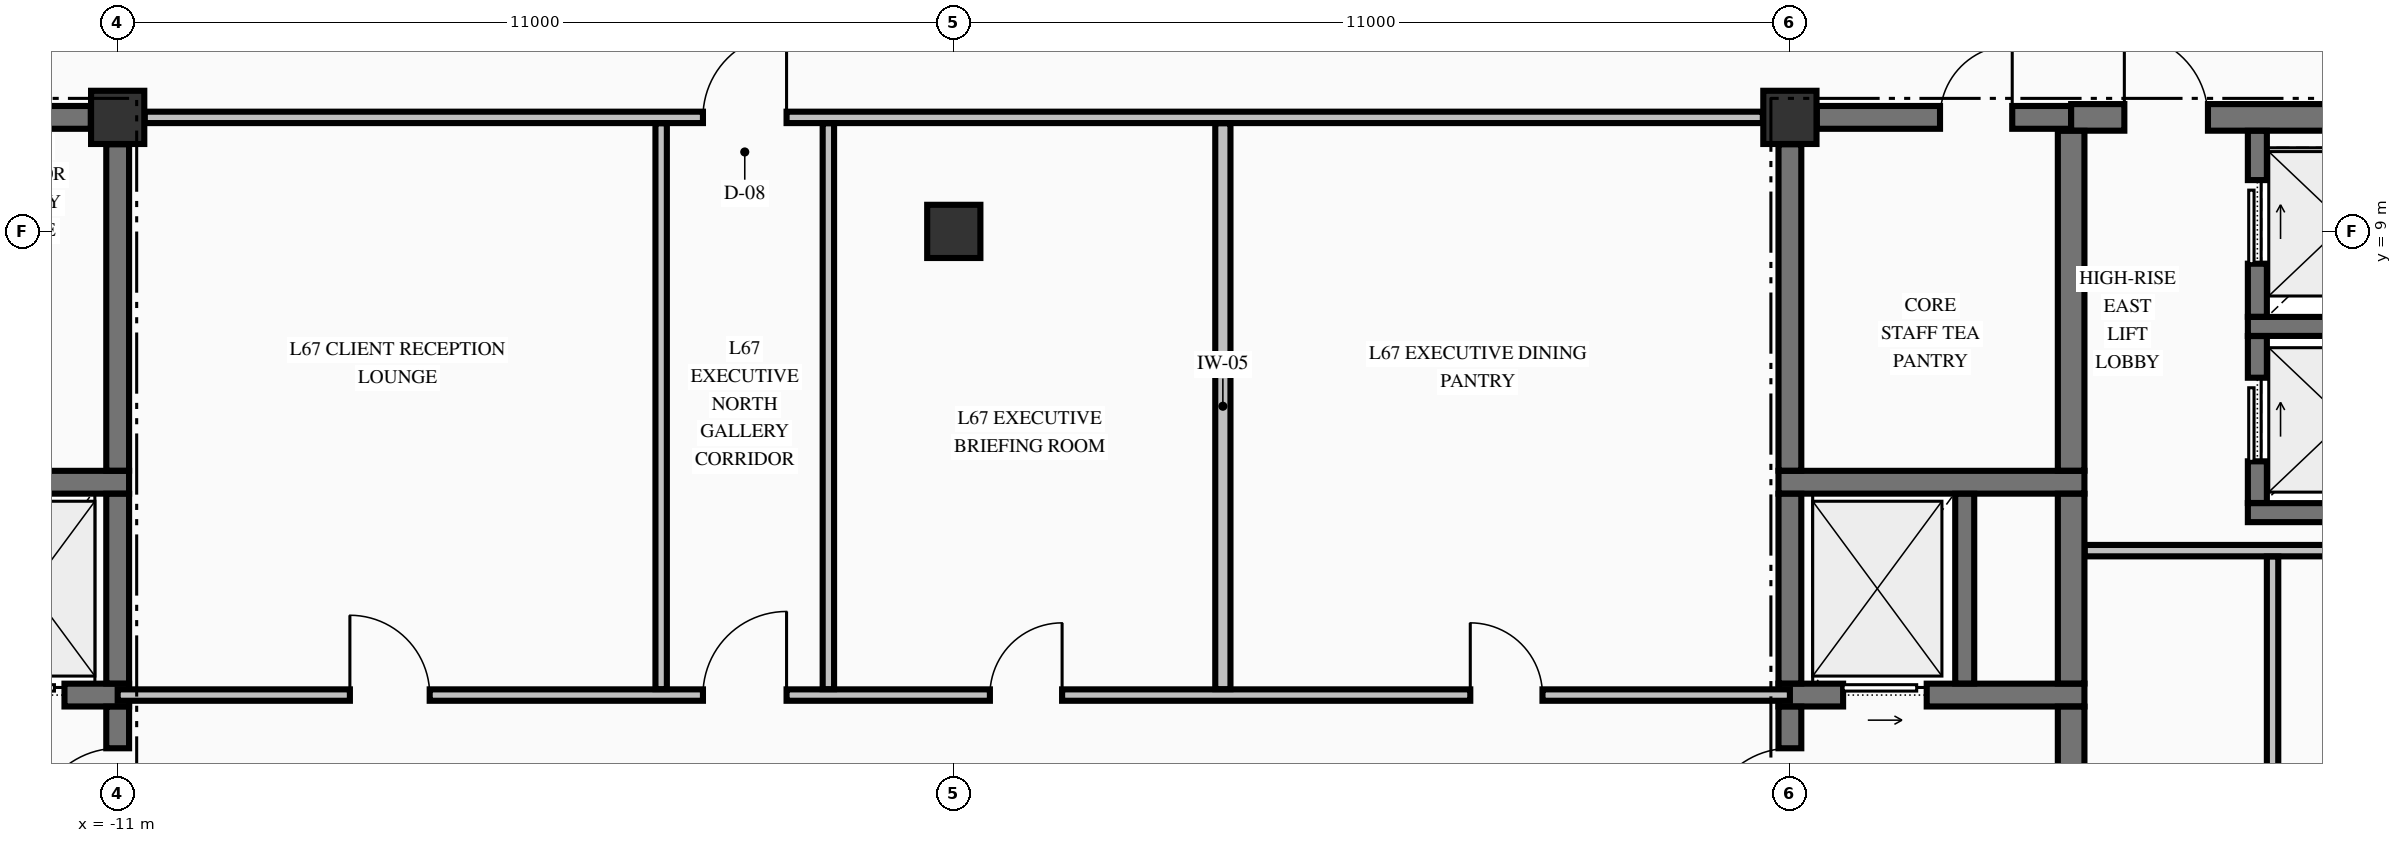
"""IFC4 building model, lengths in metres.
Left out: names, types, materials, properties, quantities, classifications, styles, units other than length and angle.
Written with IfcOpenShell. Run it as: python <this file> out.ifc"""

import sys

from ifc_helpers import new_model, si_unit, direction, frame, frame_2d, origin, origin_2d, place, context, subcontext, project, spatial, rectangle, extrude, element, fill, save


model = new_model("IFC4")
c1 = context("Model", 3, precision=1e-05, world=origin(), true_north=direction((0.0, 1.0)))
c2 = subcontext(c1, "Body", "Model", "MODEL_VIEW")
j1 = project(units=[si_unit("LENGTHUNIT", "METRE"), si_unit("PLANEANGLEUNIT", "RADIAN")], contexts=[c1])
p1 = place(None, origin())
s1 = spatial("IfcSite", under=j1, at=p1, CompositionType="ELEMENT")
p2 = place(p1, origin())
s2 = spatial("IfcBuilding", under=s1, at=p2, CompositionType="ELEMENT")
p3 = place(p2, frame((0.0, 0.0, 254.43)))
s3 = spatial("IfcBuildingStorey", under=s2, at=p3, CompositionType="ELEMENT", Elevation=254.43)
for number, where, z_axis, x_axis in (
    (1, (-11.0, 10.5, -0.425), (0.0, 0.0, 1.0), (1.0, 0.0, 0.0)),
    (2, (11.0, 10.5, -0.425), (0.0, 0.0, 1.0), (1.0, 0.0, 0.0)),
    (3, (0.0, 9.0, -0.425), (0.0, 0.0, 1.0), (1.0, 0.0, 0.0)),
):
    element("IfcColumn", number, at=place(p3, frame(where, z_axis=z_axis, x_axis=x_axis)), inside=s3, PredefinedType="COLUMN", context=c2, shape_type="SweptSolid", body=[
        extrude(rectangle(XDim=0.7, YDim=0.7, at=origin_2d()), origin(), (0.0, 0.0, 1.0), 3.405),
    ])
p4 = place(p3, frame((-14.875, 2.9, 0.0), z_axis=(0.0, 0.0, 1.0), x_axis=(1.0, 0.0, 0.0)))
e4 = element("IfcWall", 4, at=p4, inside=s3, PredefinedType="SHEAR", context=c2, shape_type="SweptSolid", body=[
    extrude(rectangle(XDim=4.025, YDim=0.3, at=frame_2d((2.012, 0.0))), origin(), (0.0, 0.0, 1.0), 2.98),
])
p5 = place(p4, frame((2.075, 0.0, 0.0)))
e5 = element("IfcOpeningElement", 5, at=p5, cuts=e4, PredefinedType="OPENING", context=c2, shape_type="SweptSolid", body=[
    extrude(rectangle(XDim=1.1, YDim=2.2, at=frame_2d((0.55, 1.1))), frame((0.0, 0.16, 0.0), z_axis=(0.0, -1.0, 0.0), x_axis=(1.0, 0.0, 0.0)), (0.0, 0.0, 1.0), 0.32),
])
p6 = place(p3, frame((10.85, 2.9, 0.0), z_axis=(0.0, 0.0, 1.0), x_axis=(1.0, 0.0, 0.0)))
e6 = element("IfcWall", 6, at=p6, inside=s3, PredefinedType="SHEAR", context=c2, shape_type="SweptSolid", body=[
    extrude(rectangle(XDim=4.025, YDim=0.3, at=frame_2d((2.012, 0.0))), origin(), (0.0, 0.0, 1.0), 2.98),
])
p7 = place(p6, frame((0.85, 0.0, 0.0)))
e7 = element("IfcOpeningElement", 7, at=p7, cuts=e6, PredefinedType="OPENING", context=c2, shape_type="SweptSolid", body=[
    extrude(rectangle(XDim=1.1, YDim=2.2, at=frame_2d((0.55, 1.1))), frame((0.0, 0.16, 0.0), z_axis=(0.0, -1.0, 0.0), x_axis=(1.0, 0.0, 0.0)), (0.0, 0.0, 1.0), 0.32),
])
p8 = place(p3, frame((17.025, 5.3, 0.0), z_axis=(0.0, 0.0, 1.0), x_axis=(1.0, 0.0, 0.0)))
e8 = element("IfcWall", 8, at=p8, inside=s3, PredefinedType="SOLIDWALL", context=c2, shape_type="SweptSolid", body=[
    extrude(rectangle(XDim=3.15, YDim=0.25, at=frame_2d((1.575, 0.0))), origin(), (0.0, 0.0, 1.0), 2.98),
])
for number, where, z_axis, x_axis in (
    (9, (-14.875, 5.7, 0.0), (0.0, 0.0, 1.0), (1.0, 0.0, 0.0)),
    (10, (10.85, 5.7, 0.0), (0.0, 0.0, 1.0), (1.0, 0.0, 0.0)),
):
    element("IfcWall", number, at=place(p3, frame(where, z_axis=z_axis, x_axis=x_axis)), inside=s3, PredefinedType="SHEAR", context=c2, shape_type="SweptSolid", body=[
        extrude(rectangle(XDim=4.025, YDim=0.3, at=frame_2d((2.012, 0.0))), origin(), (0.0, 0.0, 1.0), 2.98),
    ])
p9 = place(p3, frame((17.025, 7.75, 0.0), z_axis=(0.0, 0.0, 1.0), x_axis=(1.0, 0.0, 0.0)))
e11 = element("IfcWall", 11, at=p9, inside=s3, PredefinedType="SOLIDWALL", context=c2, shape_type="SweptSolid", body=[
    extrude(rectangle(XDim=3.15, YDim=0.25, at=frame_2d((1.575, 0.0))), origin(), (0.0, 0.0, 1.0), 2.98),
])
p10 = place(p3, frame((-14.7, 10.5, 0.0), z_axis=(0.0, 0.0, 1.0), x_axis=(1.0, 0.0, 0.0)))
e12 = element("IfcWall", 12, at=p10, inside=s3, PredefinedType="SHEAR", context=c2, shape_type="SweptSolid", body=[
    extrude(rectangle(XDim=3.346, YDim=0.3, at=frame_2d((1.673, 0.0))), origin(), (0.0, 0.0, 1.0), 2.98),
])
p11 = place(p10, frame((0.245, 0.0, 0.0)))
e13 = element("IfcOpeningElement", 13, at=p11, cuts=e12, PredefinedType="OPENING", context=c2, shape_type="SweptSolid", body=[
    extrude(rectangle(XDim=0.95, YDim=2.15, at=frame_2d((0.475, 1.075))), frame((0.0, 0.16, 0.0), z_axis=(0.0, -1.0, 0.0), x_axis=(1.0, 0.0, 0.0)), (0.0, 0.0, 1.0), 0.32),
])
p12 = place(p3, frame((11.354, 10.5, 0.0), z_axis=(0.0, 0.0, 1.0), x_axis=(1.0, 0.0, 0.0)))
e14 = element("IfcWall", 14, at=p12, inside=s3, PredefinedType="SHEAR", context=c2, shape_type="SweptSolid", body=[
    extrude(rectangle(XDim=3.346, YDim=0.3, at=frame_2d((1.673, 0.0))), origin(), (0.0, 0.0, 1.0), 2.98),
])
p13 = place(p12, frame((1.621, 0.0, 0.0)))
e15 = element("IfcOpeningElement", 15, at=p13, cuts=e14, PredefinedType="OPENING", context=c2, shape_type="SweptSolid", body=[
    extrude(rectangle(XDim=0.95, YDim=2.15, at=frame_2d((0.475, 1.075))), frame((0.0, 0.16, 0.0), z_axis=(0.0, -1.0, 0.0), x_axis=(1.0, 0.0, 0.0)), (0.0, 0.0, 1.0), 0.32),
])
p14 = place(p3, frame((14.7, 10.5, 0.0), z_axis=(0.0, 0.0, 1.0), x_axis=(1.0, 0.0, 0.0)))
e16 = element("IfcWall", 16, at=p14, inside=s3, PredefinedType="SHEAR", context=c2, shape_type="SweptSolid", body=[
    extrude(rectangle(XDim=4.946, YDim=0.35, at=frame_2d((2.473, 0.0))), origin(), (0.0, 0.0, 1.0), 2.98),
])
p15 = place(p14, frame((0.7, 0.0, 0.0)))
e17 = element("IfcOpeningElement", 17, at=p15, cuts=e16, PredefinedType="OPENING", context=c2, shape_type="SweptSolid", body=[
    extrude(rectangle(XDim=1.1, YDim=2.15, at=frame_2d((0.55, 1.075))), frame((0.0, 0.185, 0.0), z_axis=(0.0, -1.0, 0.0), x_axis=(1.0, 0.0, 0.0)), (0.0, 0.0, 1.0), 0.37),
])
p16 = place(p3, frame((-11.0, 2.9, 0.0), z_axis=(0.0, 0.0, 1.0), x_axis=(1.0, 0.0, 0.0)))
e18 = element("IfcWall", 18, at=p16, inside=s3, PredefinedType="PARTITIONING", context=c2, shape_type="SweptSolid", body=[
    extrude(rectangle(XDim=22.0, YDim=0.15, at=frame_2d((11.0, 0.0))), origin(), (0.0, 0.0, 1.0), 2.98),
])
p17 = place(p16, frame((7.7, 0.0, 0.0)))
e19 = element("IfcOpeningElement", 19, at=p17, cuts=e18, PredefinedType="OPENING", context=c2, shape_type="SweptSolid", body=[
    extrude(rectangle(XDim=1.1, YDim=2.15, at=frame_2d((0.55, 1.075))), frame((0.0, 0.085, 0.0), z_axis=(0.0, -1.0, 0.0), x_axis=(1.0, 0.0, 0.0)), (0.0, 0.0, 1.0), 0.17),
])
p18 = place(p16, frame((3.055, 0.0, 0.0)))
e20 = element("IfcOpeningElement", 20, at=p18, cuts=e18, PredefinedType="OPENING", context=c2, shape_type="SweptSolid", body=[
    extrude(rectangle(XDim=1.05, YDim=2.15, at=frame_2d((0.525, 1.075))), frame((0.0, 0.085, 0.0), z_axis=(0.0, -1.0, 0.0), x_axis=(1.0, 0.0, 0.0)), (0.0, 0.0, 1.0), 0.17),
])
p19 = place(p16, frame((11.475, 0.0, 0.0)))
e21 = element("IfcOpeningElement", 21, at=p19, cuts=e18, PredefinedType="OPENING", context=c2, shape_type="SweptSolid", body=[
    extrude(rectangle(XDim=0.95, YDim=2.15, at=frame_2d((0.475, 1.075))), frame((0.0, 0.085, 0.0), z_axis=(0.0, -1.0, 0.0), x_axis=(1.0, 0.0, 0.0)), (0.0, 0.0, 1.0), 0.17),
])
p20 = place(p16, frame((17.795, 0.0, 0.0)))
e22 = element("IfcOpeningElement", 22, at=p20, cuts=e18, PredefinedType="OPENING", context=c2, shape_type="SweptSolid", body=[
    extrude(rectangle(XDim=0.95, YDim=2.15, at=frame_2d((0.475, 1.075))), frame((0.0, 0.085, 0.0), z_axis=(0.0, -1.0, 0.0), x_axis=(1.0, 0.0, 0.0)), (0.0, 0.0, 1.0), 0.17),
])
p21 = place(p3, frame((14.878, 4.8, 0.0), z_axis=(0.0, 0.0, 1.0), x_axis=(1.0, 0.0, 0.0)))
e23 = element("IfcWall", 23, at=p21, inside=s3, PredefinedType="PARTITIONING", context=c2, shape_type="SweptSolid", body=[
    extrude(rectangle(XDim=4.944, YDim=0.15, at=frame_2d((2.472, 0.0))), origin(), (0.0, 0.0, 1.0), 2.98),
])
p22 = place(p3, frame((-10.644, 10.5, 0.0), z_axis=(0.0, 0.0, 1.0), x_axis=(1.0, 0.0, 0.0)))
e24 = element("IfcWall", 24, at=p22, inside=s3, PredefinedType="PARTITIONING", context=c2, shape_type="SweptSolid", body=[
    extrude(rectangle(XDim=21.288, YDim=0.15, at=frame_2d((10.644, 0.0))), origin(), (0.0, 0.0, 1.0), 2.98),
])
p23 = place(p22, frame((7.344, 0.0, 0.0)))
e25 = element("IfcOpeningElement", 25, at=p23, cuts=e24, PredefinedType="OPENING", context=c2, shape_type="SweptSolid", body=[
    extrude(rectangle(XDim=1.1, YDim=2.15, at=frame_2d((0.55, 1.075))), frame((0.0, 0.085, 0.0), z_axis=(0.0, -1.0, 0.0), x_axis=(1.0, 0.0, 0.0)), (0.0, 0.0, 1.0), 0.17),
])
p24 = place(p3, frame((-11.0, 0.354, 0.0), z_axis=(0.0, 0.0, 1.0), x_axis=(0.0, 1.0, 0.0)))
e26 = element("IfcWall", 26, at=p24, inside=s3, PredefinedType="SHEAR", context=c2, shape_type="SweptSolid", body=[
    extrude(rectangle(XDim=2.394, YDim=0.3, at=frame_2d((1.197, 0.0))), origin(), (0.0, 0.0, 1.0), 2.98),
])
p25 = place(p24, frame((0.746, 0.0, 0.0)))
e27 = element("IfcOpeningElement", 27, at=p25, cuts=e26, PredefinedType="OPENING", context=c2, shape_type="SweptSolid", body=[
    extrude(rectangle(XDim=1.1, YDim=2.15, at=frame_2d((0.55, 1.075))), frame((0.0, 0.16, 0.0), z_axis=(0.0, -1.0, 0.0), x_axis=(1.0, 0.0, 0.0)), (0.0, 0.0, 1.0), 0.32),
])
p26 = place(p3, frame((-11.0, 3.052, 0.0), z_axis=(0.0, 0.0, 1.0), x_axis=(0.0, 1.0, 0.0)))
e28 = element("IfcWall", 28, at=p26, inside=s3, PredefinedType="SHEAR", context=c2, shape_type="SweptSolid", body=[
    extrude(rectangle(XDim=2.496, YDim=0.3, at=frame_2d((1.248, 0.0))), origin(), (0.0, 0.0, 1.0), 2.98),
])
p27 = place(p3, frame((-11.0, 5.852, 0.0), z_axis=(0.0, 0.0, 1.0), x_axis=(0.0, 1.0, 0.0)))
e29 = element("IfcWall", 29, at=p27, inside=s3, PredefinedType="SHEAR", context=c2, shape_type="SweptSolid", body=[
    extrude(rectangle(XDim=4.294, YDim=0.3, at=frame_2d((2.147, 0.0))), origin(), (0.0, 0.0, 1.0), 2.98),
])
p28 = place(p3, frame((11.0, 0.354, 0.0), z_axis=(0.0, 0.0, 1.0), x_axis=(0.0, 1.0, 0.0)))
e30 = element("IfcWall", 30, at=p28, inside=s3, PredefinedType="SHEAR", context=c2, shape_type="SweptSolid", body=[
    extrude(rectangle(XDim=2.394, YDim=0.3, at=frame_2d((1.197, 0.0))), origin(), (0.0, 0.0, 1.0), 2.98),
])
p29 = place(p28, frame((0.746, 0.0, 0.0)))
e31 = element("IfcOpeningElement", 31, at=p29, cuts=e30, PredefinedType="OPENING", context=c2, shape_type="SweptSolid", body=[
    extrude(rectangle(XDim=1.1, YDim=2.15, at=frame_2d((0.55, 1.075))), frame((0.0, 0.16, 0.0), z_axis=(0.0, -1.0, 0.0), x_axis=(1.0, 0.0, 0.0)), (0.0, 0.0, 1.0), 0.32),
])
p30 = place(p3, frame((11.0, 3.052, 0.0), z_axis=(0.0, 0.0, 1.0), x_axis=(0.0, 1.0, 0.0)))
e32 = element("IfcWall", 32, at=p30, inside=s3, PredefinedType="SHEAR", context=c2, shape_type="SweptSolid", body=[
    extrude(rectangle(XDim=2.496, YDim=0.3, at=frame_2d((1.248, 0.0))), origin(), (0.0, 0.0, 1.0), 2.98),
])
p31 = place(p3, frame((11.0, 5.852, 0.0), z_axis=(0.0, 0.0, 1.0), x_axis=(0.0, 1.0, 0.0)))
e33 = element("IfcWall", 33, at=p31, inside=s3, PredefinedType="SHEAR", context=c2, shape_type="SweptSolid", body=[
    extrude(rectangle(XDim=4.294, YDim=0.3, at=frame_2d((2.147, 0.0))), origin(), (0.0, 0.0, 1.0), 2.98),
])
p32 = place(p3, frame((13.3, 3.052, 0.0), z_axis=(0.0, 0.0, 1.0), x_axis=(0.0, 1.0, 0.0)))
e34 = element("IfcWall", 34, at=p32, inside=s3, PredefinedType="SOLIDWALL", context=c2, shape_type="SweptSolid", body=[
    extrude(rectangle(XDim=2.496, YDim=0.25, at=frame_2d((1.248, 0.0))), origin(), (0.0, 0.0, 1.0), 2.98),
])
p33 = place(p3, frame((14.7, -0.098, 0.0), z_axis=(0.0, 0.0, 1.0), x_axis=(0.0, 1.0, 0.0)))
e35 = element("IfcWall", 35, at=p33, inside=s3, PredefinedType="SHEAR", context=c2, shape_type="SweptSolid", body=[
    extrude(rectangle(XDim=2.846, YDim=0.35, at=frame_2d((1.423, 0.0))), origin(), (0.0, 0.0, 1.0), 2.98),
])
p34 = place(p3, frame((14.7, 3.052, 0.0), z_axis=(0.0, 0.0, 1.0), x_axis=(0.0, 1.0, 0.0)))
e36 = element("IfcWall", 36, at=p34, inside=s3, PredefinedType="SHEAR", context=c2, shape_type="SweptSolid", body=[
    extrude(rectangle(XDim=2.496, YDim=0.35, at=frame_2d((1.248, 0.0))), origin(), (0.0, 0.0, 1.0), 2.98),
])
p35 = place(p3, frame((14.7, 5.852, 0.0), z_axis=(0.0, 0.0, 1.0), x_axis=(0.0, 1.0, 0.0)))
e37 = element("IfcWall", 37, at=p35, inside=s3, PredefinedType="SHEAR", context=c2, shape_type="SweptSolid", body=[
    extrude(rectangle(XDim=4.471, YDim=0.35, at=frame_2d((2.235, 0.0))), origin(), (0.0, 0.0, 1.0), 2.98),
])
p36 = place(p3, frame((17.15, 5.427, 0.0), z_axis=(0.0, 0.0, 1.0), x_axis=(0.0, 1.0, 0.0)))
e38 = element("IfcWall", 38, at=p36, inside=s3, PredefinedType="SOLIDWALL", context=c2, shape_type="SweptSolid", body=[
    extrude(rectangle(XDim=2.196, YDim=0.25, at=frame_2d((1.098, 0.0))), origin(), (0.0, 0.0, 1.0), 2.98),
])
p37 = place(p36, frame((0.548, 0.0, 0.0)))
e39 = element("IfcOpeningElement", 39, at=p37, cuts=e38, PredefinedType="OPENING", context=c2, shape_type="SweptSolid", body=[
    extrude(rectangle(XDim=1.1, YDim=2.2, at=frame_2d((0.55, 1.1))), frame((0.0, 0.135, 0.0), z_axis=(0.0, -1.0, 0.0), x_axis=(1.0, 0.0, 0.0)), (0.0, 0.0, 1.0), 0.27),
])
p38 = place(p3, frame((17.15, 7.877, 0.0), z_axis=(0.0, 0.0, 1.0), x_axis=(0.0, 1.0, 0.0)))
e40 = element("IfcWall", 40, at=p38, inside=s3, PredefinedType="SOLIDWALL", context=c2, shape_type="SweptSolid", body=[
    extrude(rectangle(XDim=2.446, YDim=0.25, at=frame_2d((1.223, 0.0))), origin(), (0.0, 0.0, 1.0), 2.98),
])
p39 = place(p38, frame((0.698, 0.0, 0.0)))
e41 = element("IfcOpeningElement", 41, at=p39, cuts=e40, PredefinedType="OPENING", context=c2, shape_type="SweptSolid", body=[
    extrude(rectangle(XDim=1.1, YDim=2.2, at=frame_2d((0.55, 1.1))), frame((0.0, 0.135, 0.0), z_axis=(0.0, -1.0, 0.0), x_axis=(1.0, 0.0, 0.0)), (0.0, 0.0, 1.0), 0.27),
])
for number, where, z_axis, x_axis in (
    (42, (-3.85, 2.978, 0.0), (0.0, 0.0, 1.0), (0.0, 1.0, 0.0)),
    (43, (-1.65, 2.978, 0.0), (0.0, 0.0, 1.0), (0.0, 1.0, 0.0)),
):
    element("IfcWall", number, at=place(p3, frame(where, z_axis=z_axis, x_axis=x_axis)), inside=s3, PredefinedType="PARTITIONING", context=c2, shape_type="SweptSolid", body=[
        extrude(rectangle(XDim=7.444, YDim=0.15, at=frame_2d((3.722, 0.0))), origin(), (0.0, 0.0, 1.0), 2.98),
    ])
p40 = place(p3, frame((3.54, 2.978, 0.0), z_axis=(0.0, 0.0, 1.0), x_axis=(0.0, 1.0, 0.0)))
e44 = element("IfcWall", 44, at=p40, inside=s3, PredefinedType="PARTITIONING", context=c2, shape_type="SweptSolid", body=[
    extrude(rectangle(XDim=7.444, YDim=0.2, at=frame_2d((3.722, 0.0))), origin(), (0.0, 0.0, 1.0), 2.98),
])
p41 = place(p3, frame((17.35, -9.772, 0.0), z_axis=(0.0, 0.0, 1.0), x_axis=(0.0, 1.0, 0.0)))
e45 = element("IfcWall", 45, at=p41, inside=s3, PredefinedType="PARTITIONING", context=c2, shape_type="SweptSolid", body=[
    extrude(rectangle(XDim=14.494, YDim=0.15, at=frame_2d((7.247, 0.0))), origin(), (0.0, 0.0, 1.0), 2.98),
])
p42 = place(p25, origin())
e46 = element("IfcDoor", 46, at=p42, inside=s3, OperationType="SINGLE_SWING_LEFT", PredefinedType="DOOR", context=c2, shape_type="SweptSolid", body=[
    extrude(rectangle(XDim=1.1, YDim=2.15, at=frame_2d((0.55, 1.075))), frame((0.0, 0.025, 0.0), z_axis=(0.0, -1.0, 0.0), x_axis=(1.0, 0.0, 0.0)), (0.0, 0.0, 1.0), 0.05),
])
fill(e27, e46)
p43 = place(p5, origin())
e47 = element("IfcDoor", 47, at=p43, inside=s3, OperationType="SLIDING_TO_LEFT", PredefinedType="DOOR", context=c2, shape_type="SweptSolid", body=[
    extrude(rectangle(XDim=1.1, YDim=2.2, at=frame_2d((0.55, 1.1))), frame((0.0, 0.025, 0.0), z_axis=(0.0, -1.0, 0.0), x_axis=(1.0, 0.0, 0.0)), (0.0, 0.0, 1.0), 0.05),
])
fill(e5, e47)
p44 = place(p29, origin())
e48 = element("IfcDoor", 48, at=p44, inside=s3, OperationType="SINGLE_SWING_LEFT", PredefinedType="DOOR", context=c2, shape_type="SweptSolid", body=[
    extrude(rectangle(XDim=1.1, YDim=2.15, at=frame_2d((0.55, 1.075))), frame((0.0, 0.025, 0.0), z_axis=(0.0, -1.0, 0.0), x_axis=(1.0, 0.0, 0.0)), (0.0, 0.0, 1.0), 0.05),
])
fill(e31, e48)
p45 = place(p7, origin())
e49 = element("IfcDoor", 49, at=p45, inside=s3, OperationType="SLIDING_TO_RIGHT", PredefinedType="DOOR", context=c2, shape_type="SweptSolid", body=[
    extrude(rectangle(XDim=1.1, YDim=2.2, at=frame_2d((0.55, 1.1))), frame((0.0, 0.025, 0.0), z_axis=(0.0, -1.0, 0.0), x_axis=(1.0, 0.0, 0.0)), (0.0, 0.0, 1.0), 0.05),
])
fill(e7, e49)
p46 = place(p13, origin())
e50 = element("IfcDoor", 50, at=p46, inside=s3, OperationType="SINGLE_SWING_RIGHT", PredefinedType="DOOR", context=c2, shape_type="SweptSolid", body=[
    extrude(rectangle(XDim=0.95, YDim=2.15, at=frame_2d((0.475, 1.075))), frame((0.0, 0.025, 0.0), z_axis=(0.0, -1.0, 0.0), x_axis=(1.0, 0.0, 0.0)), (0.0, 0.0, 1.0), 0.05),
])
fill(e15, e50)
p47 = place(p37, origin())
e51 = element("IfcDoor", 51, at=p47, inside=s3, OperationType="SLIDING_TO_RIGHT", PredefinedType="DOOR", context=c2, shape_type="SweptSolid", body=[
    extrude(rectangle(XDim=1.1, YDim=2.2, at=frame_2d((0.55, 1.1))), frame((0.0, 0.025, 0.0), z_axis=(0.0, -1.0, 0.0), x_axis=(1.0, 0.0, 0.0)), (0.0, 0.0, 1.0), 0.05),
])
fill(e39, e51)
p48 = place(p39, origin())
e52 = element("IfcDoor", 52, at=p48, inside=s3, OperationType="SLIDING_TO_RIGHT", PredefinedType="DOOR", context=c2, shape_type="SweptSolid", body=[
    extrude(rectangle(XDim=1.1, YDim=2.2, at=frame_2d((0.55, 1.1))), frame((0.0, 0.025, 0.0), z_axis=(0.0, -1.0, 0.0), x_axis=(1.0, 0.0, 0.0)), (0.0, 0.0, 1.0), 0.05),
])
fill(e41, e52)
p49 = place(p15, origin())
e53 = element("IfcDoor", 53, at=p49, inside=s3, OperationType="SINGLE_SWING_LEFT", PredefinedType="DOOR", context=c2, shape_type="SweptSolid", body=[
    extrude(rectangle(XDim=1.1, YDim=2.15, at=frame_2d((0.55, 1.075))), frame((0.0, 0.025, 0.0), z_axis=(0.0, -1.0, 0.0), x_axis=(1.0, 0.0, 0.0)), (0.0, 0.0, 1.0), 0.05),
])
fill(e17, e53)
p50 = place(p23, origin())
e54 = element("IfcDoor", 54, at=p50, inside=s3, OperationType="SINGLE_SWING_RIGHT", PredefinedType="DOOR", context=c2, shape_type="SweptSolid", body=[
    extrude(rectangle(XDim=1.1, YDim=2.15, at=frame_2d((0.55, 1.075))), frame((0.0, 0.025, 0.0), z_axis=(0.0, -1.0, 0.0), x_axis=(1.0, 0.0, 0.0)), (0.0, 0.0, 1.0), 0.05),
])
fill(e25, e54)
p51 = place(p17, origin())
e55 = element("IfcDoor", 55, at=p51, inside=s3, OperationType="SINGLE_SWING_RIGHT", PredefinedType="DOOR", context=c2, shape_type="SweptSolid", body=[
    extrude(rectangle(XDim=1.1, YDim=2.15, at=frame_2d((0.55, 1.075))), frame((0.0, 0.025, 0.0), z_axis=(0.0, -1.0, 0.0), x_axis=(1.0, 0.0, 0.0)), (0.0, 0.0, 1.0), 0.05),
])
fill(e19, e55)
p52 = place(p18, origin())
e56 = element("IfcDoor", 56, at=p52, inside=s3, OperationType="SINGLE_SWING_LEFT", PredefinedType="DOOR", context=c2, shape_type="SweptSolid", body=[
    extrude(rectangle(XDim=1.05, YDim=2.15, at=frame_2d((0.525, 1.075))), frame((0.0, 0.025, 0.0), z_axis=(0.0, -1.0, 0.0), x_axis=(1.0, 0.0, 0.0)), (0.0, 0.0, 1.0), 0.05),
])
fill(e20, e56)
p53 = place(p19, origin())
e57 = element("IfcDoor", 57, at=p53, inside=s3, OperationType="SINGLE_SWING_RIGHT", PredefinedType="DOOR", context=c2, shape_type="SweptSolid", body=[
    extrude(rectangle(XDim=0.95, YDim=2.15, at=frame_2d((0.475, 1.075))), frame((0.0, 0.025, 0.0), z_axis=(0.0, -1.0, 0.0), x_axis=(1.0, 0.0, 0.0)), (0.0, 0.0, 1.0), 0.05),
])
fill(e21, e57)
p54 = place(p20, origin())
e58 = element("IfcDoor", 58, at=p54, inside=s3, OperationType="SINGLE_SWING_LEFT", PredefinedType="DOOR", context=c2, shape_type="SweptSolid", body=[
    extrude(rectangle(XDim=0.95, YDim=2.15, at=frame_2d((0.475, 1.075))), frame((0.0, 0.025, 0.0), z_axis=(0.0, -1.0, 0.0), x_axis=(1.0, 0.0, 0.0)), (0.0, 0.0, 1.0), 0.05),
])
fill(e22, e58)
save(model, sys.argv[1])
